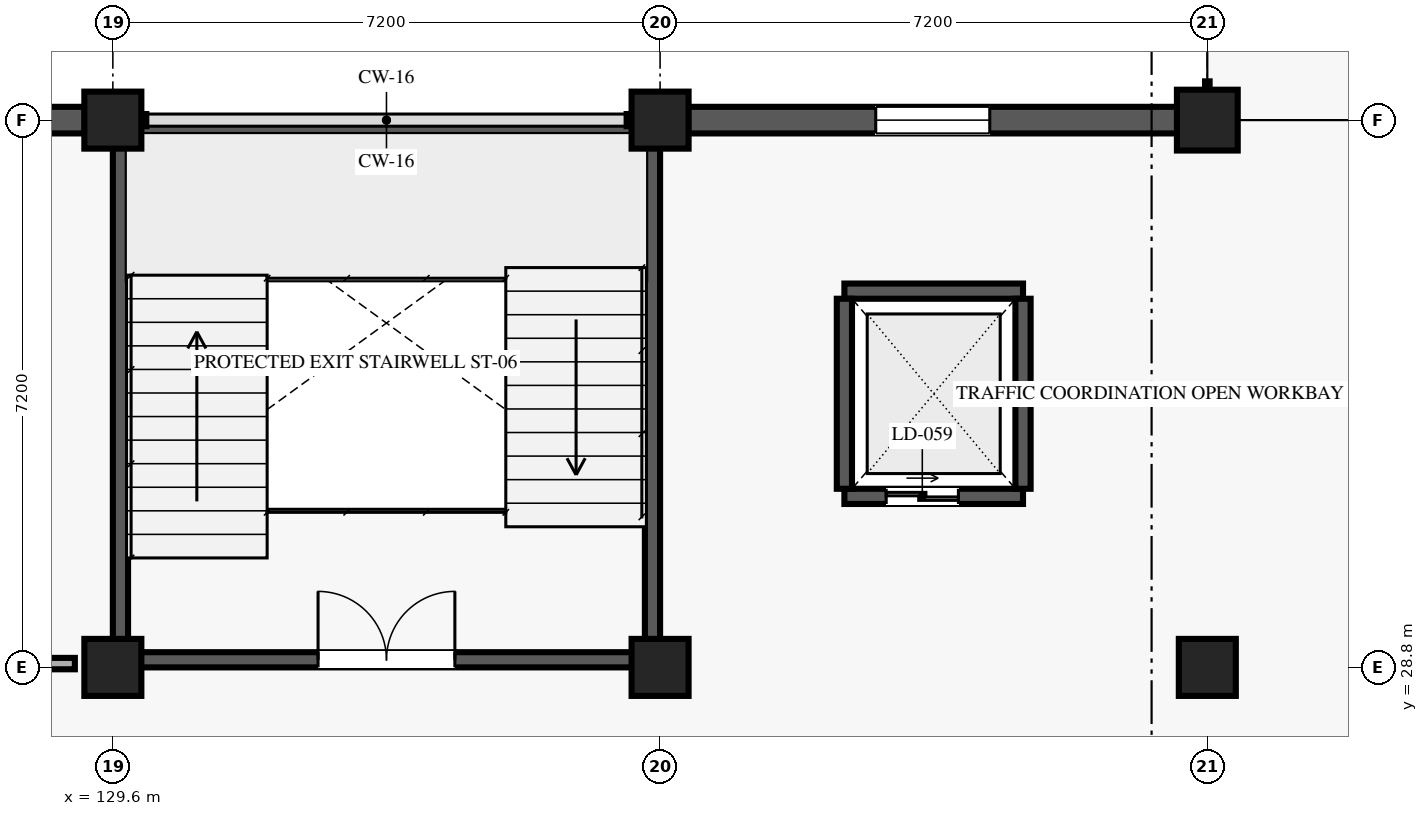
"""IFC4 building model, lengths in metres.
Left out: names, types, materials, properties, quantities, classifications, styles, units other than length and angle.
Written with IfcOpenShell. Run it as: python <this file> out.ifc"""

import sys

from ifc_helpers import new_model, si_unit, direction, frame, frame_2d, origin, origin_2d, place, context, subcontext, project, spatial, rectangle, extrude, element, fill, save


model = new_model("IFC4")
c1 = context("Model", 3, precision=1e-05, world=origin(), true_north=direction((0.0, 1.0)))
c2 = subcontext(c1, "Body", "Model", "MODEL_VIEW")
j1 = project(units=[si_unit("LENGTHUNIT", "METRE"), si_unit("PLANEANGLEUNIT", "RADIAN")], contexts=[c1])
p1 = place(None, origin())
s1 = spatial("IfcSite", under=j1, at=p1, CompositionType="ELEMENT")
p2 = place(p1, origin())
s2 = spatial("IfcBuilding", under=s1, at=p2, CompositionType="ELEMENT")
p3 = place(p2, frame((0.0, 0.0, 5.4)))
s3 = spatial("IfcBuildingStorey", under=s2, at=p3, CompositionType="ELEMENT", Elevation=5.4)
for number, where, z_axis, x_axis in (
    (1, (129.6, 28.8, 0.0), (0.0, 0.0, 1.0), (1.0, 0.0, 0.0)),
    (2, (129.6, 36.0, 0.0), (0.0, 0.0, 1.0), (1.0, 0.0, 0.0)),
    (3, (136.8, 28.8, 0.0), (0.0, 0.0, 1.0), (1.0, 0.0, 0.0)),
    (4, (136.8, 36.0, 0.0), (0.0, 0.0, 1.0), (1.0, 0.0, 0.0)),
    (5, (144.0, 28.8, 0.0), (0.0, 0.0, 1.0), (1.0, 0.0, 0.0)),
):
    element("IfcColumn", number, at=place(p3, frame(where, z_axis=z_axis, x_axis=x_axis)), inside=s3, PredefinedType="COLUMN", context=c2, shape_type="SweptSolid", body=[
        extrude(rectangle(XDim=0.75, YDim=0.75, at=origin_2d()), origin(), (0.0, 0.0, 1.0), 4.05),
    ])
p4 = place(p3, frame((144.0, 36.0, 0.0), z_axis=(0.0, 0.0, 1.0), x_axis=(1.0, 0.0, 0.0)))
e6 = element("IfcColumn", 6, at=p4, inside=s3, PredefinedType="COLUMN", context=c2, shape_type="SweptSolid", body=[
    extrude(rectangle(XDim=0.8, YDim=0.8, at=origin_2d()), origin(), (0.0, 0.0, 1.0), 4.05),
])
p5 = place(p3, frame((122.745, 36.0, 0.0), z_axis=(0.0, 0.0, 1.0), x_axis=(1.0, 0.0, 0.0)))
e7 = element("IfcWall", 7, at=p5, inside=s3, PredefinedType="SOLIDWALL", context=c2, shape_type="SweptSolid", body=[
    extrude(rectangle(XDim=6.485, YDim=0.35, at=frame_2d((3.242, 0.0))), origin(), (0.0, 0.0, 1.0), 3.81),
])
p6 = place(p5, frame((2.492, 0.0, 1.85)))
e8 = element("IfcOpeningElement", 8, at=p6, cuts=e7, PredefinedType="OPENING", context=c2, shape_type="SweptSolid", body=[
    extrude(rectangle(XDim=1.5, YDim=0.7, at=frame_2d((0.75, 0.35))), frame((0.0, 0.185, 0.0), z_axis=(0.0, -1.0, 0.0), x_axis=(1.0, 0.0, 0.0)), (0.0, 0.0, 1.0), 0.37),
])
p7 = place(p3, frame((137.17, 36.0, 0.0), z_axis=(0.0, 0.0, 1.0), x_axis=(1.0, 0.0, 0.0)))
e9 = element("IfcWall", 9, at=p7, inside=s3, PredefinedType="SOLIDWALL", context=c2, shape_type="SweptSolid", body=[
    extrude(rectangle(XDim=6.435, YDim=0.35, at=frame_2d((3.218, 0.0))), origin(), (0.0, 0.0, 1.0), 3.81),
])
p8 = place(p7, frame((2.468, 0.0, 1.85)))
e10 = element("IfcOpeningElement", 10, at=p8, cuts=e9, PredefinedType="OPENING", context=c2, shape_type="SweptSolid", body=[
    extrude(rectangle(XDim=1.5, YDim=0.7, at=frame_2d((0.75, 0.35))), frame((0.0, 0.185, 0.0), z_axis=(0.0, -1.0, 0.0), x_axis=(1.0, 0.0, 0.0)), (0.0, 0.0, 1.0), 0.37),
])
p9 = place(p3, frame((129.8, 28.9, 0.0), z_axis=(0.0, 0.0, 1.0), x_axis=(1.0, 0.0, 0.0)))
e11 = element("IfcWall", 11, at=p9, inside=s3, PredefinedType="SHEAR", context=c2, shape_type="SweptSolid", body=[
    extrude(rectangle(XDim=6.8, YDim=0.2, at=frame_2d((3.4, 0.0))), origin(), (0.0, 0.0, 1.0), 3.81),
])
p10 = place(p9, frame((2.5, 0.0, 0.0)))
e12 = element("IfcOpeningElement", 12, at=p10, cuts=e11, PredefinedType="OPENING", context=c2, shape_type="SweptSolid", body=[
    extrude(rectangle(XDim=1.8, YDim=2.2, at=frame_2d((0.9, 1.1))), frame((0.0, 0.11, 0.0), z_axis=(0.0, -1.0, 0.0), x_axis=(1.0, 0.0, 0.0)), (0.0, 0.0, 1.0), 0.22),
])
for number, where, z_axis, x_axis in (
    (13, (129.8, 35.9, 0.0), (0.0, 0.0, 1.0), (1.0, 0.0, 0.0)),
    (14, (129.7, 29.0, 0.0), (0.0, 0.0, 1.0), (0.0, 1.0, 0.0)),
    (15, (136.7, 29.0, 0.0), (0.0, 0.0, 1.0), (0.0, 1.0, 0.0)),
):
    element("IfcWall", number, at=place(p3, frame(where, z_axis=z_axis, x_axis=x_axis)), inside=s3, PredefinedType="SHEAR", context=c2, shape_type="SweptSolid", body=[
        extrude(rectangle(XDim=6.8, YDim=0.2, at=frame_2d((3.4, 0.0))), origin(), (0.0, 0.0, 1.0), 3.81),
    ])
p11 = place(p3, frame((139.225, 31.05, 0.0), z_axis=(0.0, 0.0, 1.0), x_axis=(1.0, 0.0, 0.0)))
e16 = element("IfcWall", 16, at=p11, inside=s3, PredefinedType="SHEAR", context=c2, shape_type="SweptSolid", body=[
    extrude(rectangle(XDim=2.35, YDim=0.2, at=frame_2d((1.175, 0.0))), origin(), (0.0, 0.0, 1.0), 3.81),
])
p12 = place(p11, frame((0.55, 0.0, 0.0)))
e17 = element("IfcOpeningElement", 17, at=p12, cuts=e16, PredefinedType="OPENING", context=c2, shape_type="SweptSolid", body=[
    extrude(rectangle(XDim=0.95, YDim=2.1, at=frame_2d((0.475, 1.05))), frame((0.0, 0.11, 0.0), z_axis=(0.0, -1.0, 0.0), x_axis=(1.0, 0.0, 0.0)), (0.0, 0.0, 1.0), 0.22),
])
p13 = place(p3, frame((139.225, 33.75, 0.0), z_axis=(0.0, 0.0, 1.0), x_axis=(1.0, 0.0, 0.0)))
e18 = element("IfcWall", 18, at=p13, inside=s3, PredefinedType="SHEAR", context=c2, shape_type="SweptSolid", body=[
    extrude(rectangle(XDim=2.35, YDim=0.2, at=frame_2d((1.175, 0.0))), origin(), (0.0, 0.0, 1.0), 3.81),
])
for number, where, z_axis, x_axis in (
    (19, (139.225, 31.15, 0.0), (0.0, 0.0, 1.0), (0.0, 1.0, 0.0)),
    (20, (141.575, 31.15, 0.0), (0.0, 0.0, 1.0), (0.0, 1.0, 0.0)),
):
    element("IfcWall", number, at=place(p3, frame(where, z_axis=z_axis, x_axis=x_axis)), inside=s3, PredefinedType="SHEAR", context=c2, shape_type="SweptSolid", body=[
        extrude(rectangle(XDim=2.5, YDim=0.2, at=frame_2d((1.25, 0.0))), origin(), (0.0, 0.0, 1.0), 3.81),
    ])
p14 = place(p3, frame((108.65, 28.85, 0.0), z_axis=(0.0, 0.0, 1.0), x_axis=(1.0, 0.0, 0.0)))
e21 = element("IfcWall", 21, at=p14, inside=s3, PredefinedType="PARTITIONING", context=c2, shape_type="SweptSolid", body=[
    extrude(rectangle(XDim=20.45, YDim=0.15, at=frame_2d((10.225, 0.0))), origin(), (0.0, 0.0, 1.0), 3.2),
])
p15 = place(p14, frame((9.609, 0.0, 0.0)))
e22 = element("IfcOpeningElement", 22, at=p15, cuts=e21, PredefinedType="OPENING", context=c2, shape_type="SweptSolid", body=[
    extrude(rectangle(XDim=0.98, YDim=2.1, at=frame_2d((0.49, 1.05))), frame((0.0, 0.085, 0.0), z_axis=(0.0, -1.0, 0.0), x_axis=(1.0, 0.0, 0.0)), (0.0, 0.0, 1.0), 0.17),
])
p16 = place(p8, origin())
e23 = element("IfcWindow", 23, at=p16, inside=s3, PartitioningType="SINGLE_PANEL", PredefinedType="WINDOW", context=c2, shape_type="SweptSolid", body=[
    extrude(rectangle(XDim=1.5, YDim=0.7, at=frame_2d((0.75, 0.35))), frame((0.0, 0.03, 0.0), z_axis=(0.0, -1.0, 0.0), x_axis=(1.0, 0.0, 0.0)), (0.0, 0.0, 1.0), 0.06),
])
fill(e10, e23)
p17 = place(p10, origin())
e24 = element("IfcDoor", 24, at=p17, inside=s3, OperationType="DOUBLE_DOOR_SINGLE_SWING", PredefinedType="DOOR", context=c2, shape_type="SweptSolid", body=[
    extrude(rectangle(XDim=1.8, YDim=2.2, at=frame_2d((0.9, 1.1))), frame((0.0, 0.025, 0.0), z_axis=(0.0, -1.0, 0.0), x_axis=(1.0, 0.0, 0.0)), (0.0, 0.0, 1.0), 0.05),
])
fill(e12, e24)
p18 = place(p12, origin())
e25 = element("IfcDoor", 25, at=p18, inside=s3, OperationType="DOUBLE_DOOR_SLIDING", PredefinedType="DOOR", context=c2, shape_type="SweptSolid", body=[
    extrude(rectangle(XDim=0.95, YDim=2.1, at=frame_2d((0.475, 1.05))), frame((0.0, 0.025, 0.0), z_axis=(0.0, -1.0, 0.0), x_axis=(1.0, 0.0, 0.0)), (0.0, 0.0, 1.0), 0.05),
])
fill(e17, e25)
save(model, sys.argv[1])
